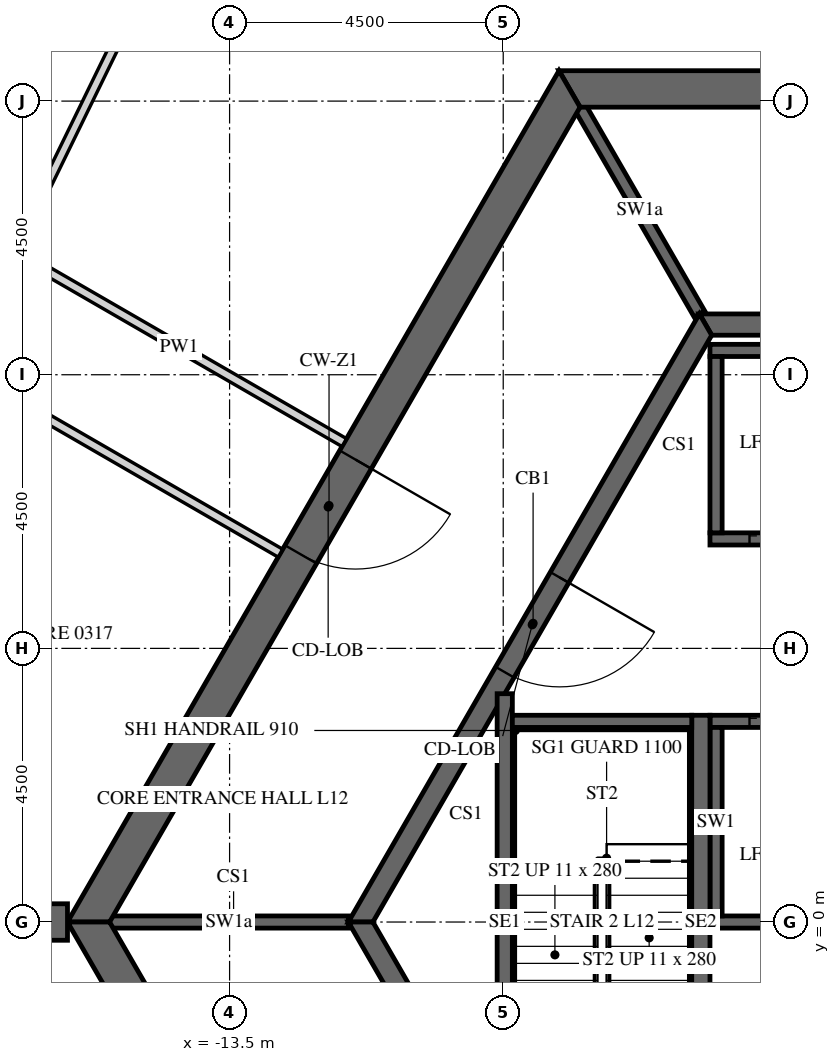
"""IFC4 building model, lengths in metres.
Left out: names, types, materials, properties, quantities, classifications, styles, units other than length and angle.
Written with IfcOpenShell. Run it as: python <this file> out.ifc"""

import sys

from ifc_helpers import new_model, si_unit, direction, frame, frame_2d, origin, place, context, subcontext, project, spatial, polyline, rectangle, outline, extrude, element, fill, save


model = new_model("IFC4")
c1 = context("Model", 3, precision=1e-05, world=origin(), true_north=direction((0.0, 1.0)))
c2 = subcontext(c1, "Body", "Model", "MODEL_VIEW")
j1 = project(units=[si_unit("LENGTHUNIT", "METRE"), si_unit("PLANEANGLEUNIT", "RADIAN")], contexts=[c1])
p1 = place(None, origin())
s1 = spatial("IfcSite", under=j1, at=p1, CompositionType="ELEMENT")
p2 = place(p1, origin())
s2 = spatial("IfcBuilding", under=s1, at=p2, CompositionType="ELEMENT")
p3 = place(p2, frame((0.0, 0.0, 60.9)))
s3 = spatial("IfcBuildingStorey", under=s2, at=p3, CompositionType="ELEMENT", Elevation=60.9)
p4 = place(p3, frame((-7.91, 13.7, -0.15), z_axis=(0.0, 0.0, 1.0), x_axis=(-0.499999880136, -0.866025472988, 0.0)))
e1 = element("IfcWall", 1, at=p4, inside=s3, PredefinedType="SHEAR", context=c2, shape_type="SweptSolid", body=[
    extrude(outline(polyline([(-0.173, -0.3), (15.993, -0.3), (15.646, 0.3), (0.173, 0.3), (-0.173, -0.3)])), origin(), (0.0, 0.0, 1.0), 3.9),
])
p5 = place(p4, frame((7.039, 0.0, 0.15)))
e2 = element("IfcOpeningElement", 2, at=p5, cuts=e1, PredefinedType="OPENING", context=c2, shape_type="SweptSolid", body=[
    extrude(rectangle(XDim=1.8, YDim=2.4, at=frame_2d((0.9, 1.2))), frame((0.0, 0.31, 0.0), z_axis=(0.0, -1.0, 0.0), x_axis=(1.0, 0.0, 0.0)), (0.0, 0.0, 1.0), 0.62),
])
p6 = place(p3, frame((-15.819, 0.0, -0.15), z_axis=(0.0, 0.0, 1.0), x_axis=(0.499999880136, -0.866025472988, 0.0)))
e3 = element("IfcWall", 3, at=p6, inside=s3, PredefinedType="SHEAR", context=c2, shape_type="SweptSolid", body=[
    extrude(outline(polyline([(-0.173, -0.3), (15.993, -0.3), (15.646, 0.3), (0.173, 0.3), (-0.173, -0.3)])), origin(), (0.0, 0.0, 1.0), 3.9),
])
p7 = place(p6, frame((6.981, 0.0, 0.15)))
e4 = element("IfcOpeningElement", 4, at=p7, cuts=e3, PredefinedType="OPENING", context=c2, shape_type="SweptSolid", body=[
    extrude(rectangle(XDim=1.8, YDim=2.4, at=frame_2d((0.9, 1.2))), frame((0.0, 0.31, 0.0), z_axis=(0.0, -1.0, 0.0), x_axis=(1.0, 0.0, 0.0)), (0.0, 0.0, 1.0), 0.62),
])
p8 = place(p3, frame((7.91, 13.7, -0.15), z_axis=(0.0, 0.0, 1.0), x_axis=(-1.0, 0.0, 0.0)))
e5 = element("IfcWall", 5, at=p8, inside=s3, PredefinedType="SHEAR", context=c2, shape_type="SweptSolid", body=[
    extrude(outline(polyline([(-0.173, -0.3), (15.993, -0.3), (15.646, 0.3), (0.173, 0.3), (-0.173, -0.3)])), origin(), (0.0, 0.0, 1.0), 3.9),
])
p9 = place(p8, frame((7.31, 0.0, 0.15)))
e6 = element("IfcOpeningElement", 6, at=p9, cuts=e5, PredefinedType="OPENING", context=c2, shape_type="SweptSolid", body=[
    extrude(rectangle(XDim=1.2, YDim=2.4, at=frame_2d((0.6, 1.2))), frame((0.0, 0.31, 0.0), z_axis=(0.0, -1.0, 0.0), x_axis=(1.0, 0.0, 0.0)), (0.0, 0.0, 1.0), 0.62),
])
p10 = place(p3, frame((-16.166, 0.0, -0.15), z_axis=(0.0, 0.0, 1.0), x_axis=(-1.0, 0.0, 0.0)))
e7 = element("IfcWall", 7, at=p10, inside=s3, PredefinedType="SHEAR", context=c2, shape_type="SweptSolid", body=[
    extrude(rectangle(XDim=16.509, YDim=0.6, at=frame_2d((8.254, 0.0))), origin(), (0.0, 0.0, 1.0), 3.9),
])
p11 = place(p10, frame((7.354, 0.0, 0.15)))
e8 = element("IfcOpeningElement", 8, at=p11, cuts=e7, PredefinedType="OPENING", context=c2, shape_type="SweptSolid", body=[
    extrude(rectangle(XDim=1.8, YDim=2.4, at=frame_2d((0.9, 1.2))), frame((0.0, 0.31, 0.0), z_axis=(0.0, -1.0, 0.0), x_axis=(1.0, 0.0, 0.0)), (0.0, 0.0, 1.0), 0.62),
])
p12 = place(p3, frame((-5.673, 9.825, -0.15), z_axis=(0.0, 0.0, 1.0), x_axis=(-0.499995046907, -0.866028263435, 0.0)))
e9 = element("IfcWall", 9, at=p12, inside=s3, PredefinedType="SHEAR", context=c2, shape_type="SweptSolid", body=[
    extrude(outline(polyline([(-0.101, -0.175), (11.446, -0.175), (11.244, 0.175), (0.101, 0.175), (-0.101, -0.175)])), origin(), (0.0, 0.0, 1.0), 3.9),
])
p13 = place(p12, frame((4.801, 0.0, 0.15)))
e10 = element("IfcOpeningElement", 10, at=p13, cuts=e9, PredefinedType="OPENING", context=c2, shape_type="SweptSolid", body=[
    extrude(rectangle(XDim=1.8, YDim=2.4, at=frame_2d((0.9, 1.2))), frame((0.0, 0.185, 0.0), z_axis=(0.0, -1.0, 0.0), x_axis=(1.0, 0.0, 0.0)), (0.0, 0.0, 1.0), 0.37),
])
p14 = place(p3, frame((-11.345, 0.0, -0.15), z_axis=(0.0, 0.0, 1.0), x_axis=(0.499995046907, -0.866028263435, 0.0)))
e11 = element("IfcWall", 11, at=p14, inside=s3, PredefinedType="SHEAR", context=c2, shape_type="SweptSolid", body=[
    extrude(outline(polyline([(-0.101, -0.175), (11.446, -0.175), (11.244, 0.175), (0.101, 0.175), (-0.101, -0.175)])), origin(), (0.0, 0.0, 1.0), 3.9),
])
p15 = place(p14, frame((4.744, 0.0, 0.15)))
e12 = element("IfcOpeningElement", 12, at=p15, cuts=e11, PredefinedType="OPENING", context=c2, shape_type="SweptSolid", body=[
    extrude(rectangle(XDim=1.8, YDim=2.4, at=frame_2d((0.9, 1.2))), frame((0.0, 0.185, 0.0), z_axis=(0.0, -1.0, 0.0), x_axis=(1.0, 0.0, 0.0)), (0.0, 0.0, 1.0), 0.37),
])
p16 = place(p3, frame((5.673, 9.825, -0.15), z_axis=(0.0, 0.0, 1.0), x_axis=(-1.0, 0.0, 0.0)))
e13 = element("IfcWall", 13, at=p16, inside=s3, PredefinedType="SHEAR", context=c2, shape_type="SweptSolid", body=[
    extrude(outline(polyline([(-0.101, -0.175), (11.446, -0.175), (11.244, 0.175), (0.101, 0.175), (-0.101, -0.175)])), origin(), (0.0, 0.0, 1.0), 3.9),
])
p17 = place(p3, frame((-5.6, 6.3, -0.25), z_axis=(0.0, 0.0, 1.0), x_axis=(1.0, 0.0, 0.0)))
e14 = element("IfcWall", 14, at=p17, inside=s3, PredefinedType="SHEAR", context=c2, shape_type="SweptSolid", body=[
    extrude(rectangle(XDim=11.2, YDim=0.2, at=frame_2d((5.6, 0.0))), origin(), (0.0, 0.0, 1.0), 3.9),
])
p18 = place(p17, frame((0.65, 0.0, 0.25)))
e15 = element("IfcOpeningElement", 15, at=p18, cuts=e14, PredefinedType="OPENING", context=c2, shape_type="SweptSolid", body=[
    extrude(rectangle(XDim=1.1, YDim=2.1, at=frame_2d((0.55, 1.05))), frame((0.0, 0.11, 0.0), z_axis=(0.0, -1.0, 0.0), x_axis=(1.0, 0.0, 0.0)), (0.0, 0.0, 1.0), 0.22),
])
p19 = place(p17, frame((2.85, 0.0, 0.25)))
e16 = element("IfcOpeningElement", 16, at=p19, cuts=e14, PredefinedType="OPENING", context=c2, shape_type="SweptSolid", body=[
    extrude(rectangle(XDim=1.1, YDim=2.1, at=frame_2d((0.55, 1.05))), frame((0.0, 0.11, 0.0), z_axis=(0.0, -1.0, 0.0), x_axis=(1.0, 0.0, 0.0)), (0.0, 0.0, 1.0), 0.22),
])
p20 = place(p17, frame((5.05, 0.0, 0.25)))
e17 = element("IfcOpeningElement", 17, at=p20, cuts=e14, PredefinedType="OPENING", context=c2, shape_type="SweptSolid", body=[
    extrude(rectangle(XDim=1.1, YDim=2.1, at=frame_2d((0.55, 1.05))), frame((0.0, 0.11, 0.0), z_axis=(0.0, -1.0, 0.0), x_axis=(1.0, 0.0, 0.0)), (0.0, 0.0, 1.0), 0.22),
])
p21 = place(p17, frame((7.25, 0.0, 0.25)))
e18 = element("IfcOpeningElement", 18, at=p21, cuts=e14, PredefinedType="OPENING", context=c2, shape_type="SweptSolid", body=[
    extrude(rectangle(XDim=1.1, YDim=2.1, at=frame_2d((0.55, 1.05))), frame((0.0, 0.11, 0.0), z_axis=(0.0, -1.0, 0.0), x_axis=(1.0, 0.0, 0.0)), (0.0, 0.0, 1.0), 0.22),
])
p22 = place(p17, frame((9.45, 0.0, 0.25)))
e19 = element("IfcOpeningElement", 19, at=p22, cuts=e14, PredefinedType="OPENING", context=c2, shape_type="SweptSolid", body=[
    extrude(rectangle(XDim=1.1, YDim=2.1, at=frame_2d((0.55, 1.05))), frame((0.0, 0.11, 0.0), z_axis=(0.0, -1.0, 0.0), x_axis=(1.0, 0.0, 0.0)), (0.0, 0.0, 1.0), 0.22),
])
p23 = place(p3, frame((-5.6, 9.4, -0.25), z_axis=(0.0, 0.0, 1.0), x_axis=(1.0, 0.0, 0.0)))
e20 = element("IfcWall", 20, at=p23, inside=s3, PredefinedType="SHEAR", context=c2, shape_type="SweptSolid", body=[
    extrude(rectangle(XDim=11.2, YDim=0.2, at=frame_2d((5.6, 0.0))), origin(), (0.0, 0.0, 1.0), 3.9),
])
p24 = place(p3, frame((-5.5, 6.4, -0.25), z_axis=(0.0, 0.0, 1.0), x_axis=(0.0, 1.0, 0.0)))
e21 = element("IfcWall", 21, at=p24, inside=s3, PredefinedType="SHEAR", context=c2, shape_type="SweptSolid", body=[
    extrude(rectangle(XDim=2.9, YDim=0.2, at=frame_2d((1.45, 0.0))), origin(), (0.0, 0.0, 1.0), 3.9),
])
p25 = place(p3, frame((-5.6, 3.3, -0.25), z_axis=(0.0, 0.0, 1.0), x_axis=(1.0, 0.0, 0.0)))
e22 = element("IfcWall", 22, at=p25, inside=s3, PredefinedType="SHEAR", context=c2, shape_type="SweptSolid", body=[
    extrude(rectangle(XDim=11.2, YDim=0.2, at=frame_2d((5.6, 0.0))), origin(), (0.0, 0.0, 1.0), 3.9),
])
p26 = place(p25, frame((0.65, 0.0, 0.25)))
e23 = element("IfcOpeningElement", 23, at=p26, cuts=e22, PredefinedType="OPENING", context=c2, shape_type="SweptSolid", body=[
    extrude(rectangle(XDim=1.1, YDim=2.1, at=frame_2d((0.55, 1.05))), frame((0.0, 0.11, 0.0), z_axis=(0.0, -1.0, 0.0), x_axis=(1.0, 0.0, 0.0)), (0.0, 0.0, 1.0), 0.22),
])
p27 = place(p25, frame((2.85, 0.0, 0.25)))
e24 = element("IfcOpeningElement", 24, at=p27, cuts=e22, PredefinedType="OPENING", context=c2, shape_type="SweptSolid", body=[
    extrude(rectangle(XDim=1.1, YDim=2.1, at=frame_2d((0.55, 1.05))), frame((0.0, 0.11, 0.0), z_axis=(0.0, -1.0, 0.0), x_axis=(1.0, 0.0, 0.0)), (0.0, 0.0, 1.0), 0.22),
])
p28 = place(p25, frame((5.05, 0.0, 0.25)))
e25 = element("IfcOpeningElement", 25, at=p28, cuts=e22, PredefinedType="OPENING", context=c2, shape_type="SweptSolid", body=[
    extrude(rectangle(XDim=1.1, YDim=2.1, at=frame_2d((0.55, 1.05))), frame((0.0, 0.11, 0.0), z_axis=(0.0, -1.0, 0.0), x_axis=(1.0, 0.0, 0.0)), (0.0, 0.0, 1.0), 0.22),
])
p29 = place(p25, frame((7.25, 0.0, 0.25)))
e26 = element("IfcOpeningElement", 26, at=p29, cuts=e22, PredefinedType="OPENING", context=c2, shape_type="SweptSolid", body=[
    extrude(rectangle(XDim=1.1, YDim=2.1, at=frame_2d((0.55, 1.05))), frame((0.0, 0.11, 0.0), z_axis=(0.0, -1.0, 0.0), x_axis=(1.0, 0.0, 0.0)), (0.0, 0.0, 1.0), 0.22),
])
p30 = place(p25, frame((9.45, 0.0, 0.25)))
e27 = element("IfcOpeningElement", 27, at=p30, cuts=e22, PredefinedType="OPENING", context=c2, shape_type="SweptSolid", body=[
    extrude(rectangle(XDim=1.1, YDim=2.1, at=frame_2d((0.55, 1.05))), frame((0.0, 0.11, 0.0), z_axis=(0.0, -1.0, 0.0), x_axis=(1.0, 0.0, 0.0)), (0.0, 0.0, 1.0), 0.22),
])
p31 = place(p3, frame((-5.6, 0.0, -0.25), z_axis=(0.0, 0.0, 1.0), x_axis=(1.0, 0.0, 0.0)))
e28 = element("IfcWall", 28, at=p31, inside=s3, PredefinedType="SHEAR", context=c2, shape_type="SweptSolid", body=[
    extrude(rectangle(XDim=11.2, YDim=0.2, at=frame_2d((5.6, 0.0))), origin(), (0.0, 0.0, 1.0), 3.9),
])
p32 = place(p3, frame((-5.5, 0.1, -0.25), z_axis=(0.0, 0.0, 1.0), x_axis=(0.0, 1.0, 0.0)))
e29 = element("IfcWall", 29, at=p32, inside=s3, PredefinedType="SHEAR", context=c2, shape_type="SweptSolid", body=[
    extrude(rectangle(XDim=3.1, YDim=0.2, at=frame_2d((1.55, 0.0))), origin(), (0.0, 0.0, 1.0), 3.9),
])
p33 = place(p3, frame((-5.773, 10.0, -0.15), z_axis=(0.0, 0.0, 1.0), x_axis=(-0.500038251005, 0.86600331843, 0.0)))
e30 = element("IfcWall", 30, at=p33, inside=s3, PredefinedType="SHEAR", context=c2, shape_type="SweptSolid", body=[
    extrude(rectangle(XDim=3.926, YDim=0.2, at=frame_2d((1.963, 0.0))), origin(), (0.0, 0.0, 1.0), 3.9),
])
p34 = place(p3, frame((-11.547, 0.0, -0.15), z_axis=(0.0, 0.0, 1.0), x_axis=(-1.0, 0.0, 0.0)))
e31 = element("IfcWall", 31, at=p34, inside=s3, PredefinedType="SHEAR", context=c2, shape_type="SweptSolid", body=[
    extrude(rectangle(XDim=3.926, YDim=0.2, at=frame_2d((1.963, 0.0))), origin(), (0.0, 0.0, 1.0), 3.9),
])
p35 = place(p3, frame((-5.75, -3.4, -0.25), z_axis=(0.0, 0.0, 1.0), x_axis=(0.0, 1.0, 0.0)))
e32 = element("IfcWall", 32, at=p35, inside=s3, PredefinedType="SHEAR", context=c2, shape_type="SweptSolid", body=[
    extrude(rectangle(XDim=6.8, YDim=0.3, at=frame_2d((3.4, 0.0))), origin(), (0.0, 0.0, 1.0), 3.9),
])
p36 = place(p3, frame((-8.975, -3.755, -0.25), z_axis=(0.0, 0.0, 1.0), x_axis=(0.0, 1.0, 0.0)))
e33 = element("IfcWall", 33, at=p36, inside=s3, PredefinedType="SHEAR", context=c2, shape_type="SweptSolid", body=[
    extrude(rectangle(XDim=7.51, YDim=0.25, at=frame_2d((3.755, 0.0))), origin(), (0.0, 0.0, 1.0), 3.9),
])
p37 = place(p3, frame((-8.85, 3.3, -0.25), z_axis=(0.0, 0.0, 1.0), x_axis=(1.0, 0.0, 0.0)))
e34 = element("IfcWall", 34, at=p37, inside=s3, PredefinedType="SHEAR", context=c2, shape_type="SweptSolid", body=[
    extrude(rectangle(XDim=2.95, YDim=0.2, at=frame_2d((1.475, 0.0))), origin(), (0.0, 0.0, 1.0), 3.9),
])
p38 = place(p3, frame((-13.752, 21.875, 0.0), z_axis=(0.0, 0.0, 1.0), x_axis=(-0.438376846054, -0.898791266559, 0.0)))
e35 = element("IfcWall", 35, at=p38, inside=s3, PredefinedType="PARTITIONING", context=c2, shape_type="SweptSolid", body=[
    extrude(rectangle(XDim=22.002, YDim=0.15, at=frame_2d((11.001, 0.0))), origin(), (0.0, 0.0, 1.0), 2.988),
])
p39 = place(p38, frame((3.269, 0.0, 0.0)))
e36 = element("IfcOpeningElement", 36, at=p39, cuts=e35, PredefinedType="OPENING", context=c2, shape_type="SweptSolid", body=[
    extrude(rectangle(XDim=1.0, YDim=2.1, at=frame_2d((0.5, 1.05))), frame((0.0, 0.085, 0.0), z_axis=(0.0, -1.0, 0.0), x_axis=(1.0, 0.0, 0.0)), (0.0, 0.0, 1.0), 0.17),
])
p40 = place(p38, frame((11.321, 0.0, 0.0)))
e37 = element("IfcOpeningElement", 37, at=p40, cuts=e35, PredefinedType="OPENING", context=c2, shape_type="SweptSolid", body=[
    extrude(rectangle(XDim=1.0, YDim=2.1, at=frame_2d((0.5, 1.05))), frame((0.0, 0.085, 0.0), z_axis=(0.0, -1.0, 0.0), x_axis=(1.0, 0.0, 0.0)), (0.0, 0.0, 1.0), 0.17),
])
p41 = place(p38, frame((19.812, 0.0, 0.0)))
e38 = element("IfcOpeningElement", 38, at=p41, cuts=e35, PredefinedType="OPENING", context=c2, shape_type="SweptSolid", body=[
    extrude(rectangle(XDim=1.0, YDim=2.1, at=frame_2d((0.5, 1.05))), frame((0.0, 0.085, 0.0), z_axis=(0.0, -1.0, 0.0), x_axis=(1.0, 0.0, 0.0)), (0.0, 0.0, 1.0), 0.17),
])
p42 = place(p3, frame((-11.614, 7.884, 0.0), z_axis=(0.0, 0.0, 1.0), x_axis=(-0.866025438137, 0.4999999405, 0.0)))
e39 = element("IfcWall", 39, at=p42, inside=s3, PredefinedType="PARTITIONING", context=c2, shape_type="SweptSolid", body=[
    extrude(rectangle(XDim=6.271, YDim=0.15, at=frame_2d((3.135, 0.0))), origin(), (0.0, 0.0, 1.0), 2.988),
])
p43 = place(p3, frame((-17.011, 11.087, 0.0), z_axis=(0.0, 0.0, 1.0), x_axis=(0.43836877185, 0.898795204631, 0.0)))
e40 = element("IfcWall", 40, at=p43, inside=s3, PredefinedType="PARTITIONING", context=c2, shape_type="SweptSolid", body=[
    extrude(rectangle(XDim=10.083, YDim=0.15, at=frame_2d((5.042, 0.0))), origin(), (0.0, 0.0, 1.0), 2.988),
])
p44 = place(p3, frame((-17.902, 9.09, 0.0), z_axis=(0.0, 0.0, 1.0), x_axis=(0.866036368755, -0.499981007633, 0.0)))
e41 = element("IfcWall", 41, at=p44, inside=s3, PredefinedType="PARTITIONING", context=c2, shape_type="SweptSolid", body=[
    extrude(rectangle(XDim=6.049, YDim=0.15, at=frame_2d((3.024, 0.0))), origin(), (0.0, 0.0, 1.0), 2.988),
])
p45 = place(p5, origin())
e42 = element("IfcDoor", 42, at=p45, inside=s3, OperationType="DOUBLE_DOOR_SINGLE_SWING", PredefinedType="DOOR", context=c2, shape_type="SweptSolid", body=[
    extrude(rectangle(XDim=1.8, YDim=2.4, at=frame_2d((0.9, 1.2))), frame((0.0, 0.025, 0.0), z_axis=(0.0, -1.0, 0.0), x_axis=(1.0, 0.0, 0.0)), (0.0, 0.0, 1.0), 0.05),
])
fill(e2, e42)
p46 = place(p13, origin())
e43 = element("IfcDoor", 43, at=p46, inside=s3, OperationType="DOUBLE_DOOR_SINGLE_SWING", PredefinedType="DOOR", context=c2, shape_type="SweptSolid", body=[
    extrude(rectangle(XDim=1.8, YDim=2.4, at=frame_2d((0.9, 1.2))), frame((0.0, 0.025, 0.0), z_axis=(0.0, -1.0, 0.0), x_axis=(1.0, 0.0, 0.0)), (0.0, 0.0, 1.0), 0.05),
])
fill(e10, e43)
p47 = place(p18, origin())
e44 = element("IfcDoor", 44, at=p47, inside=s3, OperationType="SLIDING_TO_LEFT", PredefinedType="DOOR", context=c2, shape_type="SweptSolid", body=[
    extrude(rectangle(XDim=1.1, YDim=2.1, at=frame_2d((0.55, 1.05))), frame((0.0, 0.025, 0.0), z_axis=(0.0, -1.0, 0.0), x_axis=(1.0, 0.0, 0.0)), (0.0, 0.0, 1.0), 0.05),
])
fill(e15, e44)
p48 = place(p26, origin())
e45 = element("IfcDoor", 45, at=p48, inside=s3, OperationType="SLIDING_TO_LEFT", PredefinedType="DOOR", context=c2, shape_type="SweptSolid", body=[
    extrude(rectangle(XDim=1.1, YDim=2.1, at=frame_2d((0.55, 1.05))), frame((0.0, 0.025, 0.0), z_axis=(0.0, -1.0, 0.0), x_axis=(1.0, 0.0, 0.0)), (0.0, 0.0, 1.0), 0.05),
])
fill(e23, e45)
save(model, sys.argv[1])
